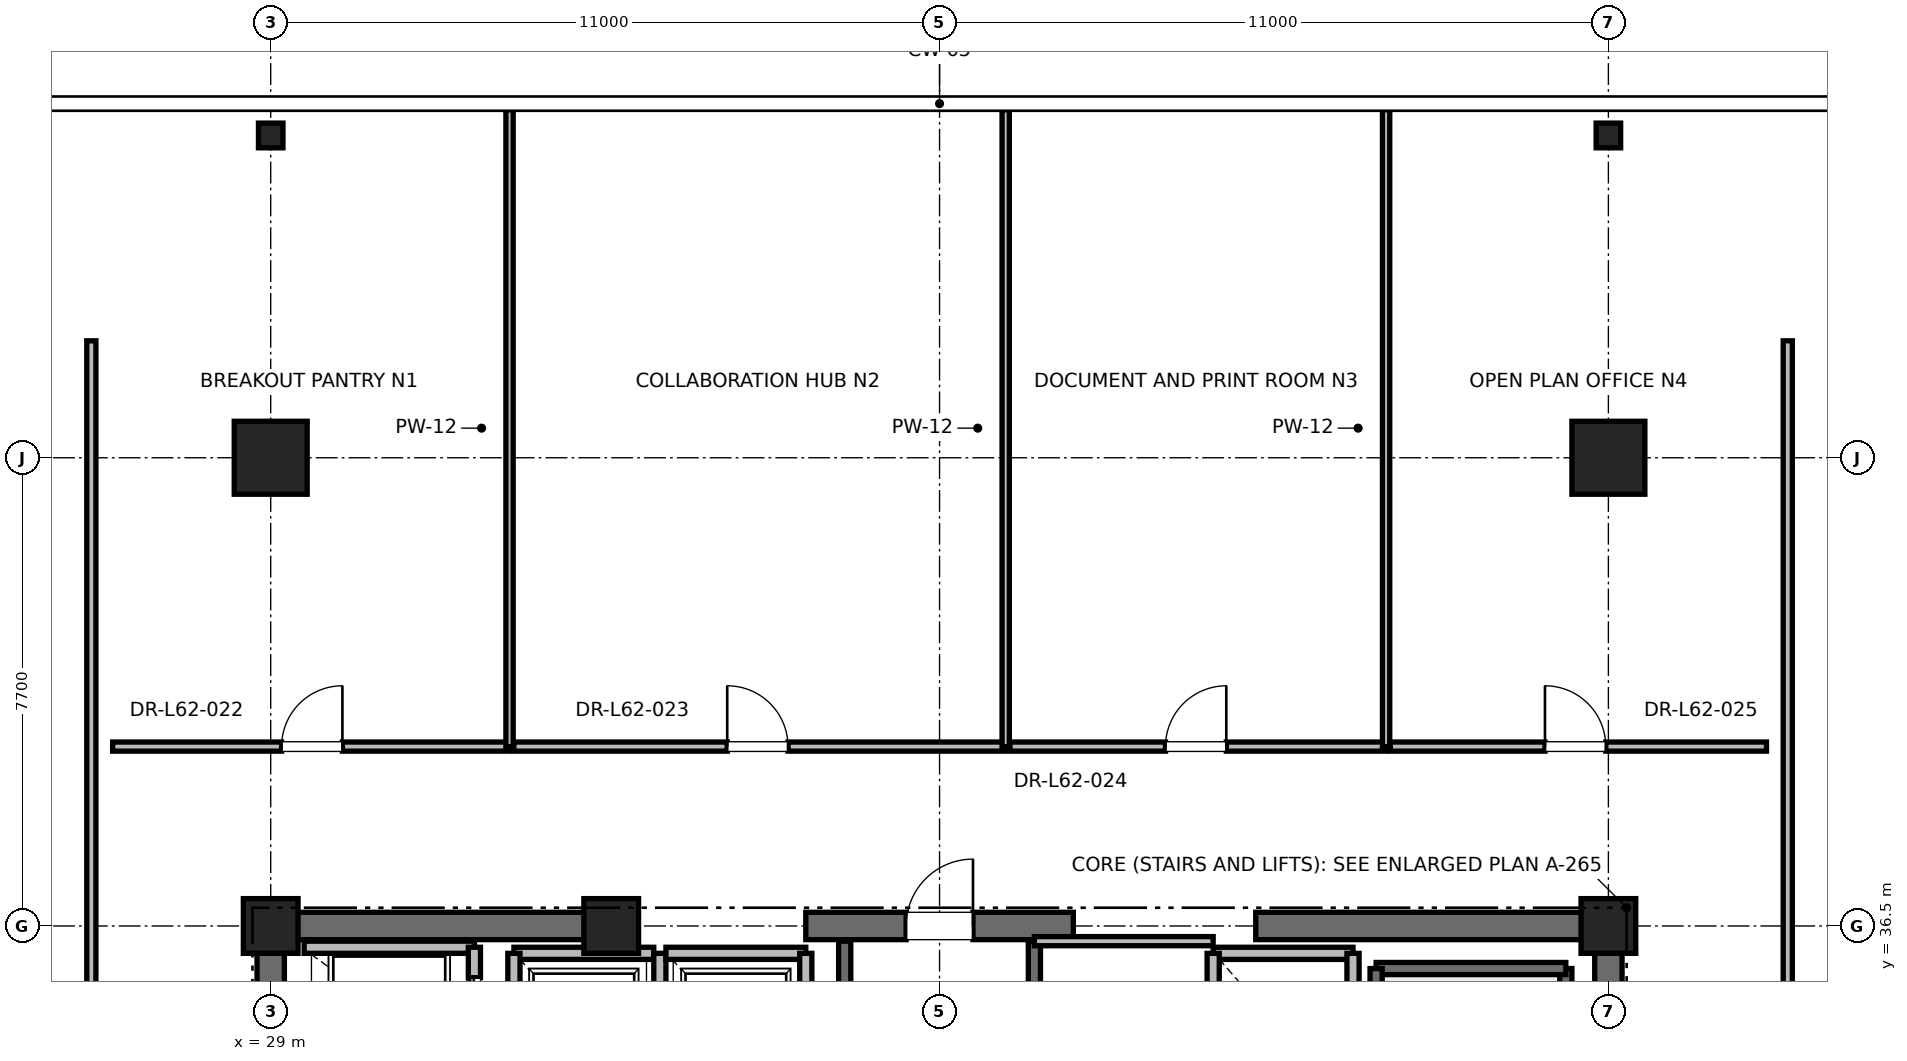
"""IFC4 building model, lengths in metres.
Left out: names, types, materials, properties, quantities, classifications, styles, units other than length and angle.
Written with IfcOpenShell. Run it as: python <this file> out.ifc"""

import sys

from ifc_helpers import new_model, si_unit, direction, frame, frame_2d, origin, origin_2d, place, context, subcontext, project, spatial, rectangle, i_section, extrude, element, fill, save


model = new_model("IFC4")
c1 = context("Model", 3, precision=1e-05, world=origin(), true_north=direction((0.0, 1.0)))
c2 = subcontext(c1, "Body", "Model", "MODEL_VIEW")
j1 = project(units=[si_unit("LENGTHUNIT", "METRE"), si_unit("PLANEANGLEUNIT", "RADIAN")], contexts=[c1])
p1 = place(None, origin())
s1 = spatial("IfcSite", under=j1, at=p1, CompositionType="ELEMENT")
p2 = place(p1, origin())
s2 = spatial("IfcBuilding", under=s1, at=p2, CompositionType="ELEMENT")
p3 = place(p2, frame((0.0, 0.0, 267.2)))
s3 = spatial("IfcBuildingStorey", under=s2, at=p3, CompositionType="ELEMENT", Elevation=267.2)
for number, where, z_axis, x_axis in (
    (1, (29.0, 44.2, 0.0), (0.0, 0.0, 1.0), (1.0, 0.0, 0.0)),
    (2, (51.0, 44.2, 0.0), (0.0, 0.0, 1.0), (1.0, 0.0, 0.0)),
):
    element("IfcColumn", number, at=place(p3, frame(where, z_axis=z_axis, x_axis=x_axis)), inside=s3, PredefinedType="COLUMN", context=c2, shape_type="SweptSolid", body=[
        extrude(rectangle(XDim=1.2, YDim=1.2, at=origin_2d()), origin(), (0.0, 0.0, 1.0), 4.0),
    ])
for number, where, z_axis, x_axis in (
    (3, (29.0, 49.5, 0.0), (0.0, 0.0, 1.0), (1.0, 0.0, 0.0)),
    (4, (51.0, 49.5, 0.0), (0.0, 0.0, 1.0), (1.0, 0.0, 0.0)),
):
    element("IfcColumn", number, at=place(p3, frame(where, z_axis=z_axis, x_axis=x_axis)), inside=s3, PredefinedType="COLUMN", context=c2, shape_type="SweptSolid", body=[
        extrude(i_section(OverallWidth=0.403, OverallDepth=0.406, WebThickness=0.027, FlangeThickness=0.043, FilletRadius=0.015, at=origin_2d()), origin(), (0.0, 0.0, 1.0), 4.0),
    ])
for number, where, z_axis, x_axis in (
    (5, (29.0, 36.5, 0.0), (0.0, 0.0, 1.0), (1.0, 0.0, 0.0)),
    (6, (51.0, 36.5, 0.0), (0.0, 0.0, 1.0), (1.0, 0.0, 0.0)),
    (7, (34.6, 36.5, 0.0), (0.0, 0.0, 1.0), (1.0, 0.0, 0.0)),
):
    element("IfcColumn", number, at=place(p3, frame(where, z_axis=z_axis, x_axis=x_axis)), inside=s3, PredefinedType="PILASTER", context=c2, shape_type="SweptSolid", body=[
        extrude(rectangle(XDim=0.9, YDim=0.9, at=origin_2d()), origin(), (0.0, 0.0, 1.0), 4.0),
    ])
p4 = place(p3, frame((29.0, 36.5, 0.0), z_axis=(0.0, 0.0, 1.0), x_axis=(1.0, 0.0, 0.0)))
e8 = element("IfcWall", 8, at=p4, inside=s3, PredefinedType="SHEAR", context=c2, shape_type="SweptSolid", body=[
    extrude(rectangle(XDim=5.8, YDim=0.45, at=frame_2d((2.9, 0.0))), origin(), (0.0, 0.0, 1.0), 3.785),
])
p5 = place(p3, frame((37.8, 36.5, 0.0), z_axis=(0.0, 0.0, 1.0), x_axis=(1.0, 0.0, 0.0)))
e9 = element("IfcWall", 9, at=p5, inside=s3, PredefinedType="SHEAR", context=c2, shape_type="SweptSolid", body=[
    extrude(rectangle(XDim=4.4, YDim=0.45, at=frame_2d((2.2, 0.0))), origin(), (0.0, 0.0, 1.0), 3.785),
])
p6 = place(p5, frame((1.65, 0.0, 0.0)))
e10 = element("IfcOpeningElement", 10, at=p6, cuts=e9, PredefinedType="OPENING", context=c2, shape_type="SweptSolid", body=[
    extrude(rectangle(XDim=1.1, YDim=2.15, at=frame_2d((0.55, 1.075))), frame((0.0, 0.225, 0.0), z_axis=(0.0, -1.0, 0.0), x_axis=(1.0, 0.0, 0.0)), (0.0, 0.0, 1.0), 0.45),
])
for number, where, z_axis, x_axis in (
    (11, (45.2, 36.5, 0.0), (0.0, 0.0, 1.0), (1.0, 0.0, 0.0)),
    (12, (29.0, 30.7, 0.0), (0.0, 0.0, 1.0), (0.0, 1.0, 0.0)),
):
    element("IfcWall", number, at=place(p3, frame(where, z_axis=z_axis, x_axis=x_axis)), inside=s3, PredefinedType="SHEAR", context=c2, shape_type="SweptSolid", body=[
        extrude(rectangle(XDim=5.8, YDim=0.45, at=frame_2d((2.9, 0.0))), origin(), (0.0, 0.0, 1.0), 3.785),
    ])
p7 = place(p3, frame((51.0, 27.7, 0.0), z_axis=(0.0, 0.0, 1.0), x_axis=(0.0, 1.0, 0.0)))
e13 = element("IfcWall", 13, at=p7, inside=s3, PredefinedType="SHEAR", context=c2, shape_type="SweptSolid", body=[
    extrude(rectangle(XDim=8.8, YDim=0.45, at=frame_2d((4.4, 0.0))), origin(), (0.0, 0.0, 1.0), 3.785),
])
p8 = place(p3, frame((50.3, 27.65, 0.0), z_axis=(0.0, 0.0, 1.0), x_axis=(0.0, 1.0, 0.0)))
e14 = element("IfcWall", 14, at=p8, inside=s3, PredefinedType="SOLIDWALL", context=c2, shape_type="SweptSolid", body=[
    extrude(rectangle(XDim=8.15, YDim=0.2, at=frame_2d((4.075, 0.0))), origin(), (0.0, 0.0, 1.0), 3.785),
])
p9 = place(p3, frame((47.18, 35.8, 0.0), z_axis=(0.0, 0.0, 1.0), x_axis=(1.0, 0.0, 0.0)))
e15 = element("IfcWall", 15, at=p9, inside=s3, PredefinedType="SOLIDWALL", context=c2, shape_type="SweptSolid", body=[
    extrude(rectangle(XDim=3.12, YDim=0.2, at=frame_2d((1.56, 0.0))), origin(), (0.0, 0.0, 1.0), 3.785),
])
p10 = place(p3, frame((47.18, 27.62, 0.0), z_axis=(0.0, 0.0, 1.0), x_axis=(0.0, 1.0, 0.0)))
e16 = element("IfcWall", 16, at=p10, inside=s3, PredefinedType="SOLIDWALL", context=c2, shape_type="SweptSolid", body=[
    extrude(rectangle(XDim=8.18, YDim=0.2, at=frame_2d((4.09, 0.0))), origin(), (0.0, 0.0, 1.0), 3.785),
])
p11 = place(p3, frame((38.44, 27.38, 0.0), z_axis=(0.0, 0.0, 1.0), x_axis=(0.0, 1.0, 0.0)))
e17 = element("IfcWall", 17, at=p11, inside=s3, PredefinedType="SOLIDWALL", context=c2, shape_type="SweptSolid", body=[
    extrude(rectangle(XDim=8.87, YDim=0.2, at=frame_2d((4.435, 0.0))), origin(), (0.0, 0.0, 1.0), 3.785),
])
p12 = place(p3, frame((41.56, 27.68, 0.0), z_axis=(0.0, 0.0, 1.0), x_axis=(0.0, 1.0, 0.0)))
e18 = element("IfcWall", 18, at=p12, inside=s3, PredefinedType="SOLIDWALL", context=c2, shape_type="SweptSolid", body=[
    extrude(rectangle(XDim=8.57, YDim=0.2, at=frame_2d((4.285, 0.0))), origin(), (0.0, 0.0, 1.0), 3.785),
])
p13 = place(p3, frame((32.35, 36.15, 0.0), z_axis=(0.0, 0.0, 1.0), x_axis=(-1.0, 0.0, 0.0)))
e19 = element("IfcWall", 19, at=p13, inside=s3, PredefinedType="SOLIDWALL", context=c2, shape_type="SweptSolid", body=[
    extrude(rectangle(XDim=2.8, YDim=0.2, at=frame_2d((1.4, 0.0))), origin(), (0.0, 0.0, 1.0), 3.148),
])
p14 = place(p3, frame((32.35, 34.05, 0.0), z_axis=(0.0, 0.0, 1.0), x_axis=(0.0, 1.0, 0.0)))
e20 = element("IfcWall", 20, at=p14, inside=s3, PredefinedType="SOLIDWALL", context=c2, shape_type="SweptSolid", body=[
    extrude(rectangle(XDim=2.1, YDim=0.2, at=frame_2d((1.05, 0.0))), origin(), (0.0, 0.0, 1.0), 3.785),
])
p15 = place(p14, frame((0.5, 0.0, 0.0)))
e21 = element("IfcOpeningElement", 21, at=p15, cuts=e20, PredefinedType="OPENING", context=c2, shape_type="SweptSolid", body=[
    extrude(rectangle(XDim=1.1, YDim=2.2, at=frame_2d((0.55, 1.1))), frame((0.0, 0.1, 0.0), z_axis=(0.0, -1.0, 0.0), x_axis=(1.0, 0.0, 0.0)), (0.0, 0.0, 1.0), 0.2),
])
p16 = place(p3, frame((35.3, 36.05, 0.0), z_axis=(0.0, 0.0, 1.0), x_axis=(-1.0, 0.0, 0.0)))
e22 = element("IfcWall", 22, at=p16, inside=s3, PredefinedType="SOLIDWALL", context=c2, shape_type="SweptSolid", body=[
    extrude(rectangle(XDim=2.3, YDim=0.2, at=frame_2d((1.15, 0.0))), origin(), (0.0, 0.0, 1.0), 2.865),
])
p17 = place(p3, frame((33.0, 36.05, 0.0), z_axis=(0.0, 0.0, 1.0), x_axis=(0.0, -1.0, 0.0)))
e23 = element("IfcWall", 23, at=p17, inside=s3, PredefinedType="SOLIDWALL", context=c2, shape_type="SweptSolid", body=[
    extrude(rectangle(XDim=2.6, YDim=0.2, at=frame_2d((1.3, 0.0))), origin(), (0.0, 0.0, 1.0), 3.785),
])
p18 = place(p3, frame((35.4, 33.45, 0.0), z_axis=(0.0, 0.0, 1.0), x_axis=(0.0, 1.0, 0.0)))
e24 = element("IfcWall", 24, at=p18, inside=s3, PredefinedType="SOLIDWALL", context=c2, shape_type="SweptSolid", body=[
    extrude(rectangle(XDim=2.6, YDim=0.2, at=frame_2d((1.3, 0.0))), origin(), (0.0, 0.0, 1.0), 2.865),
])
p19 = place(p3, frame((37.8, 36.05, 0.0), z_axis=(0.0, 0.0, 1.0), x_axis=(-1.0, 0.0, 0.0)))
e25 = element("IfcWall", 25, at=p19, inside=s3, PredefinedType="SOLIDWALL", context=c2, shape_type="SweptSolid", body=[
    extrude(rectangle(XDim=2.3, YDim=0.2, at=frame_2d((1.15, 0.0))), origin(), (0.0, 0.0, 1.0), 2.865),
])
p20 = place(p3, frame((37.8, 33.45, 0.0), z_axis=(0.0, 0.0, 1.0), x_axis=(0.0, 1.0, 0.0)))
e26 = element("IfcWall", 26, at=p20, inside=s3, PredefinedType="SOLIDWALL", context=c2, shape_type="SweptSolid", body=[
    extrude(rectangle(XDim=2.6, YDim=0.2, at=frame_2d((1.3, 0.0))), origin(), (0.0, 0.0, 1.0), 2.865),
])
p21 = place(p3, frame((46.8, 36.05, 0.0), z_axis=(0.0, 0.0, 1.0), x_axis=(-1.0, 0.0, 0.0)))
e27 = element("IfcWall", 27, at=p21, inside=s3, PredefinedType="SOLIDWALL", context=c2, shape_type="SweptSolid", body=[
    extrude(rectangle(XDim=2.3, YDim=0.2, at=frame_2d((1.15, 0.0))), origin(), (0.0, 0.0, 1.0), 2.865),
])
p22 = place(p3, frame((44.5, 36.05, 0.0), z_axis=(0.0, 0.0, 1.0), x_axis=(0.0, -1.0, 0.0)))
e28 = element("IfcWall", 28, at=p22, inside=s3, PredefinedType="SOLIDWALL", context=c2, shape_type="SweptSolid", body=[
    extrude(rectangle(XDim=2.6, YDim=0.2, at=frame_2d((1.3, 0.0))), origin(), (0.0, 0.0, 1.0), 2.865),
])
p23 = place(p3, frame((46.8, 33.45, 0.0), z_axis=(0.0, 0.0, 1.0), x_axis=(0.0, 1.0, 0.0)))
e29 = element("IfcWall", 29, at=p23, inside=s3, PredefinedType="SOLIDWALL", context=c2, shape_type="SweptSolid", body=[
    extrude(rectangle(XDim=2.6, YDim=0.2, at=frame_2d((1.3, 0.0))), origin(), (0.0, 0.0, 1.0), 3.785),
])
p24 = place(p3, frame((41.56, 36.25, 0.0), z_axis=(0.0, 0.0, 1.0), x_axis=(1.0, 0.0, 0.0)))
e30 = element("IfcWall", 30, at=p24, inside=s3, PredefinedType="PARTITIONING", context=c2, shape_type="SweptSolid", body=[
    extrude(rectangle(XDim=2.94, YDim=0.15, at=frame_2d((1.47, 0.0))), origin(), (0.0, 0.0, 1.0), 2.85),
])
p25 = place(p3, frame((26.4, 39.45, 0.0), z_axis=(0.0, 0.0, 1.0), x_axis=(1.0, 0.0, 0.0)))
e31 = element("IfcWall", 31, at=p25, inside=s3, PredefinedType="PARTITIONING", context=c2, shape_type="SweptSolid", body=[
    extrude(rectangle(XDim=6.528, YDim=0.15, at=frame_2d((3.264, 0.0))), origin(), (0.0, 0.0, 1.0), 2.85),
])
p26 = place(p25, frame((2.779, 0.0, 0.0)))
e32 = element("IfcOpeningElement", 32, at=p26, cuts=e31, PredefinedType="OPENING", context=c2, shape_type="SweptSolid", body=[
    extrude(rectangle(XDim=1.0, YDim=2.15, at=frame_2d((0.5, 1.075))), frame((0.0, 0.075, 0.0), z_axis=(0.0, -1.0, 0.0), x_axis=(1.0, 0.0, 0.0)), (0.0, 0.0, 1.0), 0.15),
])
p27 = place(p3, frame((32.928, 39.45, 0.0), z_axis=(0.0, 0.0, 1.0), x_axis=(0.0, 1.0, 0.0)))
e33 = element("IfcWall", 33, at=p27, inside=s3, PredefinedType="PARTITIONING", context=c2, shape_type="SweptSolid", body=[
    extrude(rectangle(XDim=10.473, YDim=0.12, at=frame_2d((5.237, 0.0))), origin(), (0.0, 0.0, 1.0), 2.415),
])
p28 = place(p3, frame((32.998, 39.45, 0.0), z_axis=(0.0, 0.0, 1.0), x_axis=(1.0, 0.0, 0.0)))
e34 = element("IfcWall", 34, at=p28, inside=s3, PredefinedType="PARTITIONING", context=c2, shape_type="SweptSolid", body=[
    extrude(rectangle(XDim=8.09, YDim=0.15, at=frame_2d((4.045, 0.0))), origin(), (0.0, 0.0, 1.0), 2.85),
])
p29 = place(p28, frame((3.51, 0.0, 0.0)))
e35 = element("IfcOpeningElement", 35, at=p29, cuts=e34, PredefinedType="OPENING", context=c2, shape_type="SweptSolid", body=[
    extrude(rectangle(XDim=1.0, YDim=2.15, at=frame_2d((0.5, 1.075))), frame((0.0, 0.075, 0.0), z_axis=(0.0, -1.0, 0.0), x_axis=(1.0, 0.0, 0.0)), (0.0, 0.0, 1.0), 0.15),
])
p30 = place(p3, frame((41.088, 39.45, 0.0), z_axis=(0.0, 0.0, 1.0), x_axis=(0.0, 1.0, 0.0)))
e36 = element("IfcWall", 36, at=p30, inside=s3, PredefinedType="PARTITIONING", context=c2, shape_type="SweptSolid", body=[
    extrude(rectangle(XDim=10.473, YDim=0.12, at=frame_2d((5.237, 0.0))), origin(), (0.0, 0.0, 1.0), 2.415),
])
p31 = place(p3, frame((41.158, 39.45, 0.0), z_axis=(0.0, 0.0, 1.0), x_axis=(1.0, 0.0, 0.0)))
e37 = element("IfcWall", 37, at=p31, inside=s3, PredefinedType="PARTITIONING", context=c2, shape_type="SweptSolid", body=[
    extrude(rectangle(XDim=6.186, YDim=0.15, at=frame_2d((3.093, 0.0))), origin(), (0.0, 0.0, 1.0), 2.85),
])
p32 = place(p31, frame((2.558, 0.0, 0.0)))
e38 = element("IfcOpeningElement", 38, at=p32, cuts=e37, PredefinedType="OPENING", context=c2, shape_type="SweptSolid", body=[
    extrude(rectangle(XDim=1.0, YDim=2.15, at=frame_2d((0.5, 1.075))), frame((0.0, 0.075, 0.0), z_axis=(0.0, -1.0, 0.0), x_axis=(1.0, 0.0, 0.0)), (0.0, 0.0, 1.0), 0.15),
])
p33 = place(p3, frame((47.344, 39.45, 0.0), z_axis=(0.0, 0.0, 1.0), x_axis=(0.0, 1.0, 0.0)))
e39 = element("IfcWall", 39, at=p33, inside=s3, PredefinedType="PARTITIONING", context=c2, shape_type="SweptSolid", body=[
    extrude(rectangle(XDim=10.473, YDim=0.12, at=frame_2d((5.237, 0.0))), origin(), (0.0, 0.0, 1.0), 2.415),
])
p34 = place(p3, frame((47.414, 39.45, 0.0), z_axis=(0.0, 0.0, 1.0), x_axis=(1.0, 0.0, 0.0)))
e40 = element("IfcWall", 40, at=p34, inside=s3, PredefinedType="PARTITIONING", context=c2, shape_type="SweptSolid", body=[
    extrude(rectangle(XDim=6.186, YDim=0.15, at=frame_2d((3.093, 0.0))), origin(), (0.0, 0.0, 1.0), 2.85),
])
p35 = place(p34, frame((2.543, 0.0, 0.0)))
e41 = element("IfcOpeningElement", 41, at=p35, cuts=e40, PredefinedType="OPENING", context=c2, shape_type="SweptSolid", body=[
    extrude(rectangle(XDim=1.0, YDim=2.15, at=frame_2d((0.5, 1.075))), frame((0.0, 0.075, 0.0), z_axis=(0.0, -1.0, 0.0), x_axis=(1.0, 0.0, 0.0)), (0.0, 0.0, 1.0), 0.15),
])
p36 = place(p3, frame((26.05, 24.59, 0.0), z_axis=(0.0, 0.0, 1.0), x_axis=(0.0, 1.0, 0.0)))
e42 = element("IfcWall", 42, at=p36, inside=s3, PredefinedType="PARTITIONING", context=c2, shape_type="SweptSolid", body=[
    extrude(rectangle(XDim=21.533, YDim=0.15, at=frame_2d((10.767, 0.0))), origin(), (0.0, 0.0, 1.0), 2.85),
])
p37 = place(p36, frame((5.405, 0.0, 0.0)))
e43 = element("IfcOpeningElement", 43, at=p37, cuts=e42, PredefinedType="OPENING", context=c2, shape_type="SweptSolid", body=[
    extrude(rectangle(XDim=1.0, YDim=2.15, at=frame_2d((0.5, 1.075))), frame((0.0, 0.075, 0.0), z_axis=(0.0, -1.0, 0.0), x_axis=(1.0, 0.0, 0.0)), (0.0, 0.0, 1.0), 0.15),
])
p38 = place(p3, frame((53.95, 33.53, 0.0), z_axis=(0.0, 0.0, 1.0), x_axis=(0.0, 1.0, 0.0)))
e44 = element("IfcWall", 44, at=p38, inside=s3, PredefinedType="PARTITIONING", context=c2, shape_type="SweptSolid", body=[
    extrude(rectangle(XDim=12.594, YDim=0.15, at=frame_2d((6.297, 0.0))), origin(), (0.0, 0.0, 1.0), 2.85),
])
p39 = place(p38, frame((0.935, 0.0, 0.0)))
e45 = element("IfcOpeningElement", 45, at=p39, cuts=e44, PredefinedType="OPENING", context=c2, shape_type="SweptSolid", body=[
    extrude(rectangle(XDim=1.0, YDim=2.15, at=frame_2d((0.5, 1.075))), frame((0.0, 0.075, 0.0), z_axis=(0.0, -1.0, 0.0), x_axis=(1.0, 0.0, 0.0)), (0.0, 0.0, 1.0), 0.15),
])
p40 = place(p6, origin())
e46 = element("IfcDoor", 46, at=p40, inside=s3, OperationType="SINGLE_SWING_RIGHT", PredefinedType="DOOR", context=c2, shape_type="SweptSolid", body=[
    extrude(rectangle(XDim=1.1, YDim=2.15, at=frame_2d((0.55, 1.075))), frame((0.0, 0.025, 0.0), z_axis=(0.0, -1.0, 0.0), x_axis=(1.0, 0.0, 0.0)), (0.0, 0.0, 1.0), 0.05),
])
fill(e10, e46)
p41 = place(p15, origin())
e47 = element("IfcDoor", 47, at=p41, inside=s3, OperationType="SLIDING_TO_RIGHT", PredefinedType="DOOR", context=c2, shape_type="SweptSolid", body=[
    extrude(rectangle(XDim=1.1, YDim=2.2, at=frame_2d((0.55, 1.1))), frame((0.0, 0.025, 0.0), z_axis=(0.0, -1.0, 0.0), x_axis=(1.0, 0.0, 0.0)), (0.0, 0.0, 1.0), 0.05),
])
fill(e21, e47)
p42 = place(p26, origin())
e48 = element("IfcDoor", 48, at=p42, inside=s3, OperationType="SINGLE_SWING_RIGHT", PredefinedType="DOOR", context=c2, shape_type="SweptSolid", body=[
    extrude(rectangle(XDim=1.0, YDim=2.15, at=frame_2d((0.5, 1.075))), frame((0.0, 0.025, 0.0), z_axis=(0.0, -1.0, 0.0), x_axis=(1.0, 0.0, 0.0)), (0.0, 0.0, 1.0), 0.05),
])
fill(e32, e48)
p43 = place(p29, origin())
e49 = element("IfcDoor", 49, at=p43, inside=s3, OperationType="SINGLE_SWING_LEFT", PredefinedType="DOOR", context=c2, shape_type="SweptSolid", body=[
    extrude(rectangle(XDim=1.0, YDim=2.15, at=frame_2d((0.5, 1.075))), frame((0.0, 0.025, 0.0), z_axis=(0.0, -1.0, 0.0), x_axis=(1.0, 0.0, 0.0)), (0.0, 0.0, 1.0), 0.05),
])
fill(e35, e49)
p44 = place(p32, origin())
e50 = element("IfcDoor", 50, at=p44, inside=s3, OperationType="SINGLE_SWING_RIGHT", PredefinedType="DOOR", context=c2, shape_type="SweptSolid", body=[
    extrude(rectangle(XDim=1.0, YDim=2.15, at=frame_2d((0.5, 1.075))), frame((0.0, 0.025, 0.0), z_axis=(0.0, -1.0, 0.0), x_axis=(1.0, 0.0, 0.0)), (0.0, 0.0, 1.0), 0.05),
])
fill(e38, e50)
p45 = place(p35, origin())
e51 = element("IfcDoor", 51, at=p45, inside=s3, OperationType="SINGLE_SWING_LEFT", PredefinedType="DOOR", context=c2, shape_type="SweptSolid", body=[
    extrude(rectangle(XDim=1.0, YDim=2.15, at=frame_2d((0.5, 1.075))), frame((0.0, 0.025, 0.0), z_axis=(0.0, -1.0, 0.0), x_axis=(1.0, 0.0, 0.0)), (0.0, 0.0, 1.0), 0.05),
])
fill(e41, e51)
save(model, sys.argv[1])
